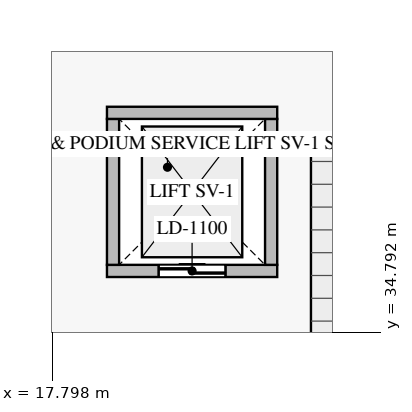
"""IFC4 building model, lengths in metres.
Left out: names, types, materials, properties, quantities, classifications, styles, units other than length and angle.
Written with IfcOpenShell. Run it as: python <this file> out.ifc"""

import sys

from ifc_helpers import new_model, si_unit, direction, frame, frame_2d, origin, place, context, subcontext, project, spatial, rectangle, extrude, source, transform, mapped, element, fill, save


model = new_model("IFC4")
c1 = context("Model", 3, precision=1e-05, world=origin(), true_north=direction((0.0, 1.0)))
c2 = subcontext(c1, "Body", "Model", "MODEL_VIEW")
j1 = project(units=[si_unit("LENGTHUNIT", "METRE"), si_unit("PLANEANGLEUNIT", "RADIAN")], contexts=[c1])
p1 = place(None, origin())
s1 = spatial("IfcSite", under=j1, at=p1, CompositionType="ELEMENT")
p2 = place(p1, origin())
s2 = spatial("IfcBuilding", under=s1, at=p2, CompositionType="ELEMENT")
p3 = place(p2, frame((0.0, 0.0, -7.2)))
s3 = spatial("IfcBuildingStorey", under=s2, at=p3, CompositionType="ELEMENT", Elevation=-7.2)
p4 = place(p3, frame((18.7, 35.8, 0.0), z_axis=(0.0, 0.0, 1.0), x_axis=(1.0, 0.0, 0.0)))
e1 = element("IfcWall", 1, at=p4, inside=s3, PredefinedType="STANDARD", context=c2, shape_type="SweptSolid", body=[
    extrude(rectangle(XDim=2.8, YDim=0.2, at=frame_2d((1.4, 0.0))), origin(), (0.0, 0.0, 1.0), 3.24),
])
p5 = place(p4, frame((0.85, 0.0, 0.0)))
e2 = element("IfcOpeningElement", 2, at=p5, cuts=e1, PredefinedType="OPENING", context=c2, shape_type="SweptSolid", body=[
    extrude(rectangle(XDim=1.1, YDim=2.2, at=frame_2d((0.55, 1.1))), frame((0.0, 0.11, 0.0), z_axis=(0.0, -1.0, 0.0), x_axis=(1.0, 0.0, 0.0)), (0.0, 0.0, 1.0), 0.22),
])
for number, where, z_axis, x_axis in (
    (3, (18.8, 35.9, 0.0), (0.0, 0.0, 1.0), (0.0, 1.0, 0.0)),
    (4, (21.4, 35.9, 0.0), (0.0, 0.0, 1.0), (0.0, 1.0, 0.0)),
):
    element("IfcWall", number, at=place(p3, frame(where, z_axis=z_axis, x_axis=x_axis)), inside=s3, PredefinedType="STANDARD", context=c2, shape_type="SweptSolid", body=[
        extrude(rectangle(XDim=2.4, YDim=0.2, at=frame_2d((1.2, 0.0))), origin(), (0.0, 0.0, 1.0), 3.24),
    ])
p6 = place(p3, frame((18.7, 38.4, 0.0), z_axis=(0.0, 0.0, 1.0), x_axis=(1.0, 0.0, 0.0)))
e5 = element("IfcWall", 5, at=p6, inside=s3, PredefinedType="STANDARD", context=c2, shape_type="SweptSolid", body=[
    extrude(rectangle(XDim=2.8, YDim=0.2, at=frame_2d((1.4, 0.0))), origin(), (0.0, 0.0, 1.0), 3.24),
])
m1 = source(origin(), c2, "Body", "SweptSolid", [
    extrude(rectangle(XDim=1.1, YDim=2.2, at=frame_2d((0.55, 1.1))), frame((0.0, 0.025, 0.0), z_axis=(0.0, -1.0, 0.0), x_axis=(1.0, 0.0, 0.0)), (0.0, 0.0, 1.0), 0.05),
])
p7 = place(p5, origin())
e6 = element("IfcDoor", 6, at=p7, inside=s3, OperationType="DOUBLE_DOOR_SLIDING", PredefinedType="DOOR", context=c2, shape_type="MappedRepresentation", body=[
    mapped(m1, transform((0.0, 0.0, 0.0), scale=1.0)),
])
fill(e2, e6)
save(model, sys.argv[1])
